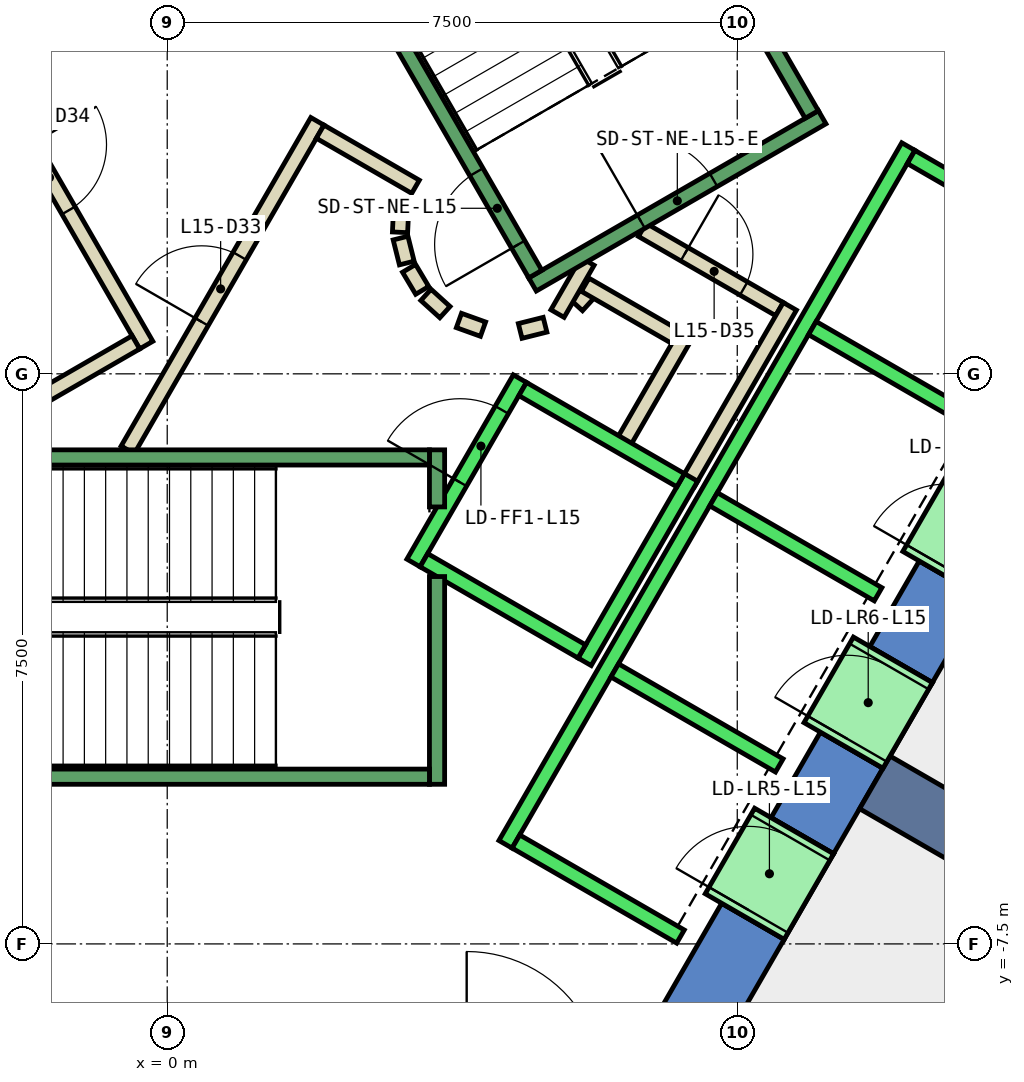
"""IFC4 building model, lengths in metres.
Left out: names, types, materials, properties, quantities, classifications, styles, units other than length and angle.
Written with IfcOpenShell. Run it as: python <this file> out.ifc"""

import sys

from ifc_helpers import new_model, si_unit, direction, frame, frame_2d, origin, place, context, subcontext, project, spatial, polyline, rectangle, outline, extrude, element, fill, save


model = new_model("IFC4")
c1 = context("Model", 3, precision=1e-05, world=origin(), true_north=direction((0.0, 1.0)))
c2 = subcontext(c1, "Body", "Model", "MODEL_VIEW")
j1 = project(units=[si_unit("LENGTHUNIT", "METRE"), si_unit("PLANEANGLEUNIT", "RADIAN")], contexts=[c1])
p1 = place(None, origin())
s1 = spatial("IfcSite", under=j1, at=p1, CompositionType="ELEMENT")
p2 = place(p1, origin())
s2 = spatial("IfcBuilding", under=s1, at=p2, CompositionType="ELEMENT")
p3 = place(p2, frame((0.0, 0.0, 72.8)))
s3 = spatial("IfcBuildingStorey", under=s2, at=p3, CompositionType="ELEMENT", Elevation=72.8)
p4 = place(p3, frame((0.0, 0.0, -0.4)))
e1 = element("IfcWall", 1, at=p4, inside=s3, PredefinedType="SHEAR", context=c2, shape_type="SweptSolid", body=[
    extrude(outline(polyline([(8.517, 11.748), (7.694, 11.273), (12.759, 2.5), (13.856, 2.5), (8.517, 11.748)])), origin(), (0.0, 0.0, 1.0), 4.2),
])
p5 = place(p3, frame((0.0, 0.0, -0.4)))
e2 = element("IfcWall", 2, at=p5, inside=s3, PredefinedType="SHEAR", context=c2, shape_type="SweptSolid", body=[
    extrude(outline(polyline([(8.117, -7.44), (7.295, -6.965), (6.38, -8.55), (6.928, -9.5), (8.117, -7.44)])), origin(), (0.0, 0.0, 1.0), 4.2),
])
p6 = place(p3, frame((0.0, 0.0, -0.4)))
e3 = element("IfcWall", 3, at=p6, inside=s3, PredefinedType="SHEAR", context=c2, shape_type="SweptSolid", body=[
    extrude(outline(polyline([(9.417, -5.189), (8.594, -4.714), (7.945, -5.839), (8.767, -6.314), (9.417, -5.189)])), origin(), (0.0, 0.0, 1.0), 4.2),
])
p7 = place(p3, frame((0.0, 0.0, -0.4)))
e4 = element("IfcWall", 4, at=p7, inside=s3, PredefinedType="SHEAR", context=c2, shape_type="SweptSolid", body=[
    extrude(outline(polyline([(10.717, -2.937), (9.894, -2.462), (9.244, -3.588), (10.067, -4.063), (10.717, -2.937)])), origin(), (0.0, 0.0, 1.0), 4.2),
])
p8 = place(p3, frame((0.0, 0.0, 3.6)))
e5 = element("IfcWall", 5, at=p8, inside=s3, PredefinedType="SHEAR", context=c2, shape_type="SweptSolid", body=[
    extrude(outline(polyline([(8.767, -6.314), (7.945, -5.839), (7.295, -6.965), (8.117, -7.44), (8.767, -6.314)])), origin(), (0.0, 0.0, 1.0), 0.2),
])
p9 = place(p3, frame((0.0, 0.0, 3.6)))
e6 = element("IfcWall", 6, at=p9, inside=s3, PredefinedType="SHEAR", context=c2, shape_type="SweptSolid", body=[
    extrude(outline(polyline([(10.067, -4.063), (9.244, -3.588), (8.594, -4.714), (9.417, -5.189), (10.067, -4.063)])), origin(), (0.0, 0.0, 1.0), 0.2),
])
p10 = place(p3, frame((0.0, 0.0, 3.6)))
e7 = element("IfcWall", 7, at=p10, inside=s3, PredefinedType="SHEAR", context=c2, shape_type="SweptSolid", body=[
    extrude(outline(polyline([(11.367, -1.811), (10.544, -1.336), (9.894, -2.462), (10.717, -2.937), (11.367, -1.811)])), origin(), (0.0, 0.0, 1.0), 0.2),
])
p11 = place(p3, frame((9.31, -5.375, -0.4), z_axis=(0.0, 0.0, 1.0), x_axis=(0.866017533419, -0.500013631625, 0.0)))
e8 = element("IfcWall", 8, at=p11, inside=s3, PredefinedType="SHEAR", context=c2, shape_type="SweptSolid", body=[
    extrude(rectangle(XDim=9.0, YDim=0.8, at=frame_2d((4.5, 0.0))), origin(), (0.0, 0.0, 1.0), 4.2),
])
p12 = place(p3, frame((5.39, 0.898, 0.0), z_axis=(0.0, 0.0, 1.0), x_axis=(0.673828488714, 0.738887791073, 0.0)))
e9 = element("IfcWall", 9, at=p12, inside=s3, PredefinedType="PARTITIONING", context=c2, shape_type="SweptSolid", body=[
    extrude(rectangle(XDim=0.263, YDim=0.2, at=frame_2d((0.131, 0.0))), origin(), (0.0, 0.0, 1.0), 3.8),
])
p13 = place(p3, frame((5.499, 1.172, 0.0), z_axis=(0.0, 0.0, 1.0), x_axis=(0.866333505267, -0.499465972466, 0.0)))
e10 = element("IfcWall", 10, at=p13, inside=s3, PredefinedType="PARTITIONING", context=c2, shape_type="SweptSolid", body=[
    extrude(rectangle(XDim=1.374, YDim=0.2, at=frame_2d((0.687, 0.0))), origin(), (0.0, 0.0, 1.0), 3.8),
])
p14 = place(p3, frame((6.826, 0.522, 0.0), z_axis=(0.0, 0.0, 1.0), x_axis=(-0.500016722714, -0.866015748706, 0.0)))
e11 = element("IfcWall", 11, at=p14, inside=s3, PredefinedType="PARTITIONING", context=c2, shape_type="SweptSolid", body=[
    extrude(rectangle(XDim=1.7, YDim=0.2, at=frame_2d((0.85, 0.0))), origin(), (0.0, 0.0, 1.0), 3.8),
])
p15 = place(p3, frame((6.25, 1.894, 0.0), z_axis=(0.0, 0.0, 1.0), x_axis=(0.866043184279, -0.499969202016, 0.0)))
e12 = element("IfcWall", 12, at=p15, inside=s3, PredefinedType="PARTITIONING", context=c2, shape_type="SweptSolid", body=[
    extrude(rectangle(XDim=2.084, YDim=0.2, at=frame_2d((1.042, 0.0))), origin(), (0.0, 0.0, 1.0), 3.8),
])
p16 = place(p15, frame((0.642, 0.0, 0.0)))
e13 = element("IfcOpeningElement", 13, at=p16, cuts=e12, PredefinedType="OPENING", context=c2, shape_type="SweptSolid", body=[
    extrude(rectangle(XDim=0.9, YDim=2.1, at=frame_2d((0.45, 1.05))), frame((0.0, 0.11, 0.0), z_axis=(0.0, -1.0, 0.0), x_axis=(1.0, 0.0, 0.0)), (0.0, 0.0, 1.0), 0.22),
])
p17 = place(p3, frame((8.192, 0.888, 0.0), z_axis=(0.0, 0.0, 1.0), x_axis=(-0.499940625693, -0.866059680843, 0.0)))
e14 = element("IfcWall", 14, at=p17, inside=s3, PredefinedType="PARTITIONING", context=c2, shape_type="SweptSolid", body=[
    extrude(rectangle(XDim=2.68, YDim=0.2, at=frame_2d((1.34, 0.0))), origin(), (0.0, 0.0, 1.0), 3.8),
])
p18 = place(p3, frame((5.135, 0.793, 0.0), z_axis=(0.0, 0.0, 1.0), x_axis=(0.499526442893, 0.866298639529, 0.0)))
e15 = element("IfcWall", 15, at=p18, inside=s3, PredefinedType="PARTITIONING", context=c2, shape_type="SweptSolid", body=[
    extrude(rectangle(XDim=0.791, YDim=0.2, at=frame_2d((0.396, 0.0))), origin(), (0.0, 0.0, 1.0), 3.8),
])
p19 = place(p3, frame((-0.52, -1.0, 0.0), z_axis=(0.0, 0.0, 1.0), x_axis=(0.50011622646, 0.865958290007, 0.0)))
e16 = element("IfcWall", 16, at=p19, inside=s3, PredefinedType="PARTITIONING", context=c2, shape_type="SweptSolid", body=[
    extrude(rectangle(XDim=4.991, YDim=0.2, at=frame_2d((2.496, 0.0))), origin(), (0.0, 0.0, 1.0), 3.8),
])
p20 = place(p19, frame((1.945, 0.0, 0.0)))
e17 = element("IfcOpeningElement", 17, at=p20, cuts=e16, PredefinedType="OPENING", context=c2, shape_type="SweptSolid", body=[
    extrude(rectangle(XDim=1.0, YDim=2.1, at=frame_2d((0.5, 1.05))), frame((0.0, 0.11, 0.0), z_axis=(0.0, -1.0, 0.0), x_axis=(1.0, 0.0, 0.0)), (0.0, 0.0, 1.0), 0.22),
])
p21 = place(p3, frame((2.012, 3.186, 0.0), z_axis=(0.0, 0.0, 1.0), x_axis=(0.865891012941, -0.500232699559, 0.0)))
e18 = element("IfcWall", 18, at=p21, inside=s3, PredefinedType="PARTITIONING", context=c2, shape_type="SweptSolid", body=[
    extrude(rectangle(XDim=1.449, YDim=0.2, at=frame_2d((0.725, 0.0))), origin(), (0.0, 0.0, 1.0), 3.8),
])
p22 = place(p3, frame((3.079, 2.199, 0.0), z_axis=(0.0, 0.0, 1.0), x_axis=(-0.047771483479, -0.998858290933, 0.0)))
e19 = element("IfcWall", 19, at=p22, inside=s3, PredefinedType="PARTITIONING", context=c2, shape_type="SweptSolid", body=[
    extrude(rectangle(XDim=0.337, YDim=0.2, at=frame_2d((0.169, 0.0))), origin(), (0.0, 0.0, 1.0), 3.8),
])
p23 = place(p3, frame((3.07, 1.786, 0.0), z_axis=(0.0, 0.0, 1.0), x_axis=(0.242705583207, -0.970099994784, 0.0)))
e20 = element("IfcWall", 20, at=p23, inside=s3, PredefinedType="PARTITIONING", context=c2, shape_type="SweptSolid", body=[
    extrude(rectangle(XDim=0.338, YDim=0.2, at=frame_2d((0.169, 0.0))), origin(), (0.0, 0.0, 1.0), 3.8),
])
for number, where, z_axis, x_axis in (
    (21, (3.182, 1.388, 0.0), (0.0, 0.0, 1.0), (0.512, -0.859, 0.0)),
    (22, (3.404, 1.039, 0.0), (0.0, 0.0, 1.0), (0.74, -0.672, 0.0)),
):
    element("IfcWall", number, at=place(p3, frame(where, z_axis=z_axis, x_axis=x_axis)), inside=s3, PredefinedType="PARTITIONING", context=c2, shape_type="SweptSolid", body=[
        extrude(rectangle(XDim=0.338, YDim=0.2, at=frame_2d((0.169, 0.0))), origin(), (0.0, 0.0, 1.0), 3.8),
    ])
p24 = place(p3, frame((3.838, 0.702, 0.0), z_axis=(0.0, 0.0, 1.0), x_axis=(0.941035081519, -0.338308993895, 0.0)))
e23 = element("IfcWall", 23, at=p24, inside=s3, PredefinedType="PARTITIONING", context=c2, shape_type="SweptSolid", body=[
    extrude(rectangle(XDim=0.337, YDim=0.2, at=frame_2d((0.168, 0.0))), origin(), (0.0, 0.0, 1.0), 3.8),
])
p25 = place(p3, frame((4.644, 0.564, 0.0), z_axis=(0.0, 0.0, 1.0), x_axis=(0.969929076366, 0.243387729394, 0.0)))
e24 = element("IfcWall", 24, at=p25, inside=s3, PredefinedType="PARTITIONING", context=c2, shape_type="SweptSolid", body=[
    extrude(rectangle(XDim=0.337, YDim=0.2, at=frame_2d((0.168, 0.0))), origin(), (0.0, 0.0, 1.0), 3.8),
])
p26 = place(p3, frame((-2.771, 4.7, 0.0), z_axis=(0.0, 0.0, 1.0), x_axis=(0.499969479948, -0.866043023828, 0.0)))
e25 = element("IfcWall", 25, at=p26, inside=s3, PredefinedType="PARTITIONING", context=c2, shape_type="SweptSolid", body=[
    extrude(rectangle(XDim=4.99, YDim=0.2, at=frame_2d((2.495, 0.0))), origin(), (0.0, 0.0, 1.0), 3.8),
])
p27 = place(p26, frame((1.945, 0.0, 0.0)))
e26 = element("IfcOpeningElement", 26, at=p27, cuts=e25, PredefinedType="OPENING", context=c2, shape_type="SweptSolid", body=[
    extrude(rectangle(XDim=1.0, YDim=2.1, at=frame_2d((0.5, 1.05))), frame((0.0, 0.11, 0.0), z_axis=(0.0, -1.0, 0.0), x_axis=(1.0, 0.0, 0.0)), (0.0, 0.0, 1.0), 0.22),
])
p28 = place(p3, frame((-0.412, 0.414, 0.0), z_axis=(0.0, 0.0, 1.0), x_axis=(-0.866017369001, -0.500013916395, 0.0)))
e27 = element("IfcWall", 27, at=p28, inside=s3, PredefinedType="PARTITIONING", context=c2, shape_type="SweptSolid", body=[
    extrude(rectangle(XDim=1.45, YDim=0.2, at=frame_2d((0.725, 0.0))), origin(), (0.0, 0.0, 1.0), 3.8),
])
p29 = place(p3, frame((12.4, -7.621, 0.0), z_axis=(0.0, 0.0, 1.0), x_axis=(-0.49990497871, -0.866080257402, 0.0)))
e28 = element("IfcWall", 28, at=p29, inside=s3, PredefinedType="PARTITIONING", context=c2, shape_type="SweptSolid", body=[
    extrude(rectangle(XDim=9.302, YDim=0.2, at=frame_2d((4.651, 0.0))), origin(), (0.0, 0.0, 1.0), 3.8),
])
p30 = place(p3, frame((3.24, -2.488, 0.0), z_axis=(0.0, 0.0, 1.0), x_axis=(0.49994636267, 0.866056369097, 0.0)))
e29 = element("IfcWall", 29, at=p30, inside=s3, PredefinedType="STANDARD", context=c2, shape_type="SweptSolid", body=[
    extrude(rectangle(XDim=2.8, YDim=0.2, at=frame_2d((1.4, 0.0))), origin(), (0.0, 0.0, 1.0), 3.8),
])
p31 = place(p30, frame((1.225, 0.0, 0.0)))
e30 = element("IfcOpeningElement", 30, at=p31, cuts=e29, PredefinedType="OPENING", context=c2, shape_type="SweptSolid", body=[
    extrude(rectangle(XDim=1.1, YDim=2.1, at=frame_2d((0.55, 1.05))), frame((0.0, 0.11, 0.0), z_axis=(0.0, -1.0, 0.0), x_axis=(1.0, 0.0, 0.0)), (0.0, 0.0, 1.0), 0.22),
])
p32 = place(p3, frame((5.492, -3.788, 0.0), z_axis=(0.0, 0.0, 1.0), x_axis=(0.500011755427, 0.866018616679, 0.0)))
e31 = element("IfcWall", 31, at=p32, inside=s3, PredefinedType="STANDARD", context=c2, shape_type="SweptSolid", body=[
    extrude(rectangle(XDim=2.8, YDim=0.2, at=frame_2d((1.4, 0.0))), origin(), (0.0, 0.0, 1.0), 3.8),
])
p33 = place(p3, frame((3.377, -2.452, 0.0), z_axis=(0.0, 0.0, 1.0), x_axis=(0.865955154139, -0.50012165622, 0.0)))
e32 = element("IfcWall", 32, at=p33, inside=s3, PredefinedType="STANDARD", context=c2, shape_type="SweptSolid", body=[
    extrude(rectangle(XDim=2.4, YDim=0.2, at=frame_2d((1.2, 0.0))), origin(), (0.0, 0.0, 1.0), 3.8),
])
p34 = place(p3, frame((4.677, -0.2, 0.0), z_axis=(0.0, 0.0, 1.0), x_axis=(0.865973769406, -0.500089422704, 0.0)))
e33 = element("IfcWall", 33, at=p34, inside=s3, PredefinedType="STANDARD", context=c2, shape_type="SweptSolid", body=[
    extrude(rectangle(XDim=2.399, YDim=0.2, at=frame_2d((1.2, 0.0))), origin(), (0.0, 0.0, 1.0), 3.8),
])
p35 = place(p3, frame((4.451, -6.19, 0.0), z_axis=(0.0, 0.0, 1.0), x_axis=(0.50000090737, 0.866024879913, 0.0)))
e34 = element("IfcWall", 34, at=p35, inside=s3, PredefinedType="STANDARD", context=c2, shape_type="SweptSolid", body=[
    extrude(rectangle(XDim=10.6, YDim=0.2, at=frame_2d((5.3, 0.0))), origin(), (0.0, 0.0, 1.0), 3.8),
])
for number, where, z_axis, x_axis in (
    (35, (4.588, -6.153, 0.0), (0.0, 0.0, 1.0), (0.866, -0.5, 0.0)),
    (36, (5.888, -3.902, 0.0), (0.0, 0.0, 1.0), (0.866, -0.5, 0.0)),
    (37, (7.188, -1.65, 0.0), (0.0, 0.0, 1.0), (0.866, -0.5, 0.0)),
    (38, (8.488, 0.602, 0.0), (0.0, 0.0, 1.0), (0.866, -0.5, 0.0)),
):
    element("IfcWall", number, at=place(p3, frame(where, z_axis=z_axis, x_axis=x_axis)), inside=s3, PredefinedType="STANDARD", context=c2, shape_type="SweptSolid", body=[
        extrude(rectangle(XDim=2.5, YDim=0.2, at=frame_2d((1.25, 0.0))), origin(), (0.0, 0.0, 1.0), 3.8),
    ])
p36 = place(p3, frame((9.788, 2.853, 0.0), z_axis=(0.0, 0.0, 1.0), x_axis=(0.865998541277, -0.500046524342, 0.0)))
e39 = element("IfcWall", 39, at=p36, inside=s3, PredefinedType="STANDARD", context=c2, shape_type="SweptSolid", body=[
    extrude(rectangle(XDim=2.5, YDim=0.2, at=frame_2d((1.25, 0.0))), origin(), (0.0, 0.0, 1.0), 3.8),
])
p37 = place(p3, frame((7.598, -7.14, 0.0), z_axis=(0.0, 0.0, 1.0), x_axis=(0.500362116554, 0.865816234728, 0.0)))
e40 = element("IfcWall", 40, at=p37, inside=s3, PredefinedType="STANDARD", context=c2, shape_type="SweptSolid", body=[
    extrude(rectangle(XDim=1.299, YDim=1.2, at=frame_2d((0.65, 0.0))), origin(), (0.0, 0.0, 1.0), 2.4),
])
p38 = place(p37, frame((0.1, 0.0, 0.0)))
e41 = element("IfcOpeningElement", 41, at=p38, cuts=e40, PredefinedType="OPENING", context=c2, shape_type="SweptSolid", body=[
    extrude(rectangle(XDim=1.1, YDim=2.3, at=frame_2d((0.55, 1.15))), frame((0.0, 0.61, 0.0), z_axis=(0.0, -1.0, 0.0), x_axis=(1.0, 0.0, 0.0)), (0.0, 0.0, 1.0), 1.22),
])
p39 = place(p3, frame((8.898, -4.889, 0.0), z_axis=(0.0, 0.0, 1.0), x_axis=(0.500036693733, 0.866004217611, 0.0)))
e42 = element("IfcWall", 42, at=p39, inside=s3, PredefinedType="STANDARD", context=c2, shape_type="SweptSolid", body=[
    extrude(rectangle(XDim=1.3, YDim=1.2, at=frame_2d((0.65, 0.0))), origin(), (0.0, 0.0, 1.0), 2.4),
])
p40 = place(p39, frame((0.1, 0.0, 0.0)))
e43 = element("IfcOpeningElement", 43, at=p40, cuts=e42, PredefinedType="OPENING", context=c2, shape_type="SweptSolid", body=[
    extrude(rectangle(XDim=1.1, YDim=2.3, at=frame_2d((0.55, 1.15))), frame((0.0, 0.61, 0.0), z_axis=(0.0, -1.0, 0.0), x_axis=(1.0, 0.0, 0.0)), (0.0, 0.0, 1.0), 1.22),
])
p41 = place(p3, frame((10.198, -2.637, 0.0), z_axis=(0.0, 0.0, 1.0), x_axis=(0.49989585183, 0.866085525409, 0.0)))
e44 = element("IfcWall", 44, at=p41, inside=s3, PredefinedType="STANDARD", context=c2, shape_type="SweptSolid", body=[
    extrude(rectangle(XDim=1.3, YDim=1.2, at=frame_2d((0.65, 0.0))), origin(), (0.0, 0.0, 1.0), 2.4),
])
p42 = place(p41, frame((0.1, 0.0, 0.0)))
e45 = element("IfcOpeningElement", 45, at=p42, cuts=e44, PredefinedType="OPENING", context=c2, shape_type="SweptSolid", body=[
    extrude(rectangle(XDim=1.1, YDim=2.3, at=frame_2d((0.55, 1.15))), frame((0.0, 0.61, 0.0), z_axis=(0.0, -1.0, 0.0), x_axis=(1.0, 0.0, 0.0)), (0.0, 0.0, 1.0), 1.22),
])
p43 = place(p3, frame((3.55, -2.667, 0.0), z_axis=(0.0, 0.0, 1.0), x_axis=(0.0, -1.0, 0.0)))
e46 = element("IfcWall", 46, at=p43, inside=s3, PredefinedType="STANDARD", context=c2, shape_type="SweptSolid", body=[
    extrude(rectangle(XDim=2.733, YDim=0.2, at=frame_2d((1.366, 0.0))), origin(), (0.0, 0.0, 1.0), 3.8),
])
p44 = place(p3, frame((3.55, -1.0, 0.0), z_axis=(0.0, 0.0, 1.0), x_axis=(0.0, -1.0, 0.0)))
e47 = element("IfcWall", 47, at=p44, inside=s3, PredefinedType="STANDARD", context=c2, shape_type="SweptSolid", body=[
    extrude(rectangle(XDim=0.751, YDim=0.2, at=frame_2d((0.375, 0.0))), origin(), (0.0, 0.0, 1.0), 3.8),
])
p45 = place(p3, frame((-3.45, -1.1, 0.0), z_axis=(0.0, 0.0, 1.0), x_axis=(1.0, 0.0, 0.0)))
e48 = element("IfcWall", 48, at=p45, inside=s3, PredefinedType="STANDARD", context=c2, shape_type="SweptSolid", body=[
    extrude(rectangle(XDim=6.9, YDim=0.2, at=frame_2d((3.45, 0.0))), origin(), (0.0, 0.0, 1.0), 3.8),
])
p46 = place(p45, frame((0.45, 0.0, 0.0)))
e49 = element("IfcOpeningElement", 49, at=p46, cuts=e48, PredefinedType="OPENING", context=c2, shape_type="SweptSolid", body=[
    extrude(rectangle(XDim=1.1, YDim=2.2, at=frame_2d((0.55, 1.1))), frame((0.0, 0.11, 0.0), z_axis=(0.0, -1.0, 0.0), x_axis=(1.0, 0.0, 0.0)), (0.0, 0.0, 1.0), 0.22),
])
p47 = place(p3, frame((-3.45, -5.3, 0.0), z_axis=(0.0, 0.0, 1.0), x_axis=(1.0, 0.0, 0.0)))
e50 = element("IfcWall", 50, at=p47, inside=s3, PredefinedType="STANDARD", context=c2, shape_type="SweptSolid", body=[
    extrude(rectangle(XDim=6.9, YDim=0.2, at=frame_2d((3.45, 0.0))), origin(), (0.0, 0.0, 1.0), 3.8),
])
p48 = place(p3, frame((4.806, 1.176, 0.0), z_axis=(0.0, 0.0, 1.0), x_axis=(0.866059941101, 0.499940174841, 0.0)))
e51 = element("IfcWall", 51, at=p48, inside=s3, PredefinedType="STANDARD", context=c2, shape_type="SweptSolid", body=[
    extrude(rectangle(XDim=4.4, YDim=0.2, at=frame_2d((2.2, 0.0))), origin(), (0.0, 0.0, 1.0), 3.8),
])
p49 = place(p48, frame((1.65, 0.0, 0.0)))
e52 = element("IfcOpeningElement", 52, at=p49, cuts=e51, PredefinedType="OPENING", context=c2, shape_type="SweptSolid", body=[
    extrude(rectangle(XDim=1.1, YDim=2.2, at=frame_2d((0.55, 1.1))), frame((0.0, 0.11, 0.0), z_axis=(0.0, -1.0, 0.0), x_axis=(1.0, 0.0, 0.0)), (0.0, 0.0, 1.0), 0.22),
])
p50 = place(p3, frame((4.843, 1.312, 0.0), z_axis=(0.0, 0.0, 1.0), x_axis=(-0.499963383562, 0.866046543262, 0.0)))
e53 = element("IfcWall", 53, at=p50, inside=s3, PredefinedType="STANDARD", context=c2, shape_type="SweptSolid", body=[
    extrude(rectangle(XDim=6.9, YDim=0.2, at=frame_2d((3.45, 0.0))), origin(), (0.0, 0.0, 1.0), 3.8),
])
p51 = place(p50, frame((0.45, 0.0, 0.0)))
e54 = element("IfcOpeningElement", 54, at=p51, cuts=e53, PredefinedType="OPENING", context=c2, shape_type="SweptSolid", body=[
    extrude(rectangle(XDim=1.1, YDim=2.2, at=frame_2d((0.55, 1.1))), frame((0.0, 0.11, 0.0), z_axis=(0.0, -1.0, 0.0), x_axis=(1.0, 0.0, 0.0)), (0.0, 0.0, 1.0), 0.22),
])
p52 = place(p3, frame((8.48, 3.412, 0.0), z_axis=(0.0, 0.0, 1.0), x_axis=(-0.499978703459, 0.866037698999, 0.0)))
e55 = element("IfcWall", 55, at=p52, inside=s3, PredefinedType="STANDARD", context=c2, shape_type="SweptSolid", body=[
    extrude(rectangle(XDim=6.9, YDim=0.2, at=frame_2d((3.45, 0.0))), origin(), (0.0, 0.0, 1.0), 3.8),
])
p53 = place(p3, frame((-1.393, 7.288, 0.0), z_axis=(0.0, 0.0, 1.0), x_axis=(-0.499963383562, -0.866046543262, 0.0)))
e56 = element("IfcWall", 56, at=p53, inside=s3, PredefinedType="STANDARD", context=c2, shape_type="SweptSolid", body=[
    extrude(rectangle(XDim=6.9, YDim=0.2, at=frame_2d((3.45, 0.0))), origin(), (0.0, 0.0, 1.0), 3.8),
])
p54 = place(p53, frame((0.45, 0.0, 0.0)))
e57 = element("IfcOpeningElement", 57, at=p54, cuts=e56, PredefinedType="OPENING", context=c2, shape_type="SweptSolid", body=[
    extrude(rectangle(XDim=1.1, YDim=2.2, at=frame_2d((0.55, 1.1))), frame((0.0, 0.11, 0.0), z_axis=(0.0, -1.0, 0.0), x_axis=(1.0, 0.0, 0.0)), (0.0, 0.0, 1.0), 0.22),
])
p55 = place(p20, origin())
e58 = element("IfcDoor", 58, at=p55, inside=s3, OperationType="SINGLE_SWING_LEFT", PredefinedType="DOOR", context=c2, shape_type="SweptSolid", body=[
    extrude(rectangle(XDim=1.0, YDim=2.1, at=frame_2d((0.5, 1.05))), frame((0.0, 0.025, 0.0), z_axis=(0.0, -1.0, 0.0), x_axis=(1.0, 0.0, 0.0)), (0.0, 0.0, 1.0), 0.05),
])
fill(e17, e58)
p56 = place(p27, origin())
e59 = element("IfcDoor", 59, at=p56, inside=s3, OperationType="SINGLE_SWING_RIGHT", PredefinedType="DOOR", context=c2, shape_type="SweptSolid", body=[
    extrude(rectangle(XDim=1.0, YDim=2.1, at=frame_2d((0.5, 1.05))), frame((0.0, 0.025, 0.0), z_axis=(0.0, -1.0, 0.0), x_axis=(1.0, 0.0, 0.0)), (0.0, 0.0, 1.0), 0.05),
])
fill(e26, e59)
p57 = place(p16, origin())
e60 = element("IfcDoor", 60, at=p57, inside=s3, OperationType="SINGLE_SWING_LEFT", PredefinedType="DOOR", context=c2, shape_type="SweptSolid", body=[
    extrude(rectangle(XDim=0.9, YDim=2.1, at=frame_2d((0.45, 1.05))), frame((0.0, 0.025, 0.0), z_axis=(0.0, -1.0, 0.0), x_axis=(1.0, 0.0, 0.0)), (0.0, 0.0, 1.0), 0.05),
])
fill(e13, e60)
p58 = place(p38, origin())
e61 = element("IfcDoor", 61, at=p58, inside=s3, OperationType="SLIDING_TO_LEFT", PredefinedType="DOOR", context=c2, shape_type="SweptSolid", body=[
    extrude(rectangle(XDim=1.1, YDim=2.3, at=frame_2d((0.55, 1.15))), frame((0.0, 0.025, 0.0), z_axis=(0.0, -1.0, 0.0), x_axis=(1.0, 0.0, 0.0)), (0.0, 0.0, 1.0), 0.05),
])
fill(e41, e61)
p59 = place(p40, origin())
e62 = element("IfcDoor", 62, at=p59, inside=s3, OperationType="SLIDING_TO_LEFT", PredefinedType="DOOR", context=c2, shape_type="SweptSolid", body=[
    extrude(rectangle(XDim=1.1, YDim=2.3, at=frame_2d((0.55, 1.15))), frame((0.0, 0.025, 0.0), z_axis=(0.0, -1.0, 0.0), x_axis=(1.0, 0.0, 0.0)), (0.0, 0.0, 1.0), 0.05),
])
fill(e43, e62)
p60 = place(p31, origin())
e63 = element("IfcDoor", 63, at=p60, inside=s3, OperationType="SLIDING_TO_LEFT", PredefinedType="DOOR", context=c2, shape_type="SweptSolid", body=[
    extrude(rectangle(XDim=1.1, YDim=2.1, at=frame_2d((0.55, 1.05))), frame((0.0, 0.025, 0.0), z_axis=(0.0, -1.0, 0.0), x_axis=(1.0, 0.0, 0.0)), (0.0, 0.0, 1.0), 0.05),
])
fill(e30, e63)
p61 = place(p51, origin())
e64 = element("IfcDoor", 64, at=p61, inside=s3, OperationType="SINGLE_SWING_LEFT", PredefinedType="DOOR", context=c2, shape_type="SweptSolid", body=[
    extrude(rectangle(XDim=1.1, YDim=2.2, at=frame_2d((0.55, 1.1))), frame((0.0, 0.025, 0.0), z_axis=(0.0, -1.0, 0.0), x_axis=(1.0, 0.0, 0.0)), (0.0, 0.0, 1.0), 0.05),
])
fill(e54, e64)
p62 = place(p49, origin())
e65 = element("IfcDoor", 65, at=p62, inside=s3, OperationType="SINGLE_SWING_LEFT", PredefinedType="DOOR", context=c2, shape_type="SweptSolid", body=[
    extrude(rectangle(XDim=1.1, YDim=2.2, at=frame_2d((0.55, 1.1))), frame((0.0, 0.025, 0.0), z_axis=(0.0, -1.0, 0.0), x_axis=(1.0, 0.0, 0.0)), (0.0, 0.0, 1.0), 0.05),
])
fill(e52, e65)
save(model, sys.argv[1])
